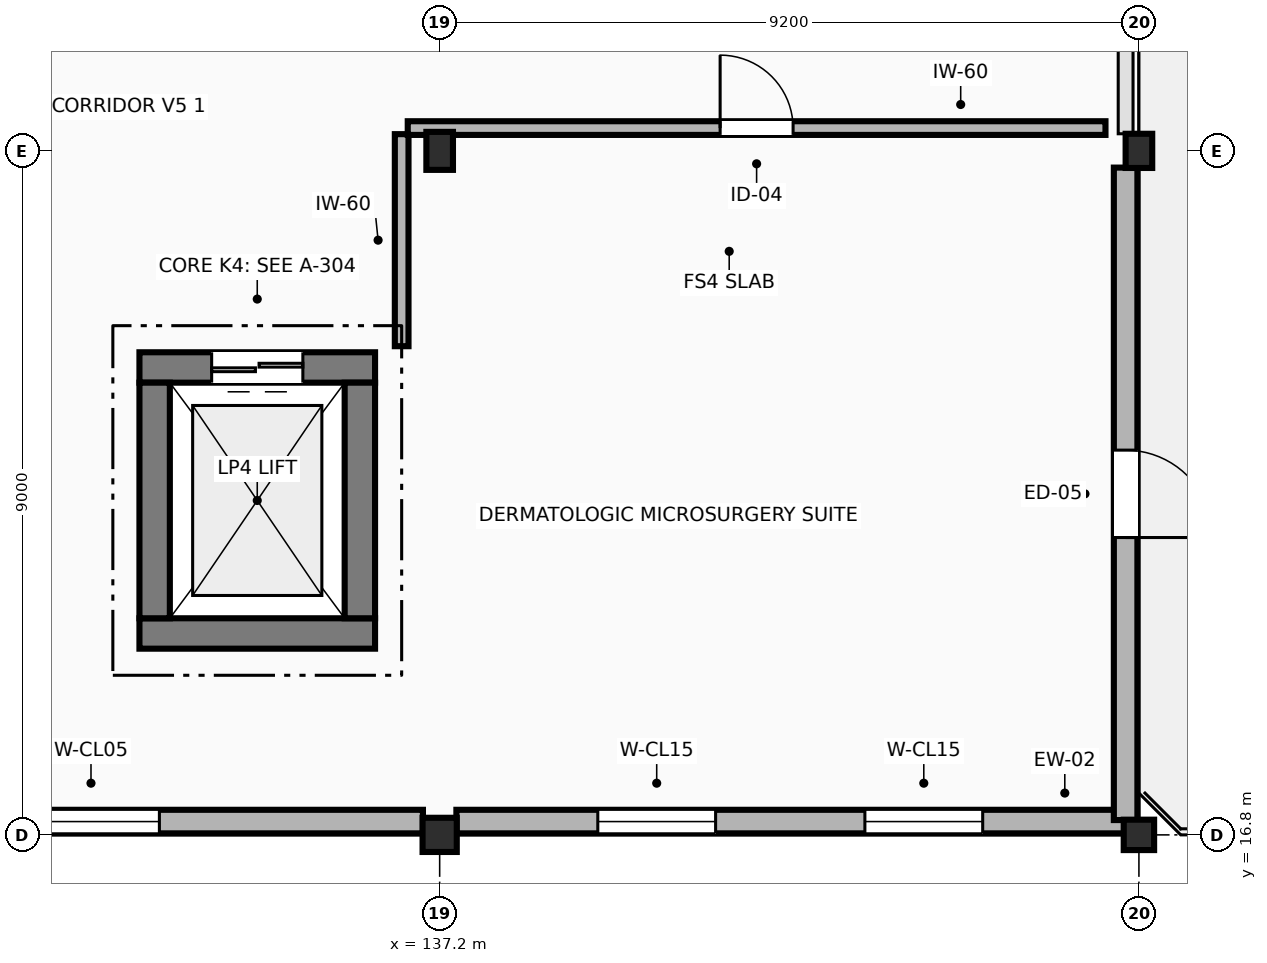
"""IFC4 building model, lengths in metres.
Left out: names, types, materials, properties, quantities, classifications, styles, units other than length and angle.
Written with IfcOpenShell. Run it as: python <this file> out.ifc"""

import sys

from ifc_helpers import new_model, si_unit, direction, frame, frame_2d, origin, origin_2d, place, context, subcontext, project, spatial, rectangle, extrude, element, fill, save


model = new_model("IFC4")
c1 = context("Model", 3, precision=1e-05, world=origin(), true_north=direction((0.0, 1.0)))
c2 = subcontext(c1, "Body", "Model", "MODEL_VIEW")
j1 = project(units=[si_unit("LENGTHUNIT", "METRE"), si_unit("PLANEANGLEUNIT", "RADIAN")], contexts=[c1])
p1 = place(None, origin())
s1 = spatial("IfcSite", under=j1, at=p1, CompositionType="ELEMENT")
p2 = place(p1, origin())
s2 = spatial("IfcBuilding", under=s1, at=p2, CompositionType="ELEMENT")
p3 = place(p2, frame((0.0, 0.0, 18.0)))
s3 = spatial("IfcBuildingStorey", under=s2, at=p3, CompositionType="ELEMENT", Elevation=18.0)
p4 = place(p3, frame((137.2, 16.8, 0.0), z_axis=(0.0, 0.0, 1.0), x_axis=(1.0, 0.0, 0.0)))
e1 = element("IfcColumn", 1, at=p4, inside=s3, PredefinedType="COLUMN", context=c2, shape_type="SweptSolid", body=[
    extrude(rectangle(XDim=0.45, YDim=0.45, at=origin_2d()), origin(), (0.0, 0.0, 1.0), 4.2),
])
p5 = place(p3, frame((137.2, 25.8, 0.0), z_axis=(0.0, 0.0, 1.0), x_axis=(1.0, 0.0, 0.0)))
e2 = element("IfcColumn", 2, at=p5, inside=s3, PredefinedType="COLUMN", context=c2, shape_type="SweptSolid", body=[
    extrude(rectangle(XDim=0.35, YDim=0.5, at=origin_2d()), origin(), (0.0, 0.0, 1.0), 4.2),
])
p6 = place(p3, frame((146.4, 16.8, 0.0), z_axis=(0.0, 0.0, 1.0), x_axis=(1.0, 0.0, 0.0)))
e3 = element("IfcColumn", 3, at=p6, inside=s3, PredefinedType="COLUMN", context=c2, shape_type="SweptSolid", body=[
    extrude(rectangle(XDim=0.4, YDim=0.4, at=origin_2d()), origin(), (0.0, 0.0, 1.0), 4.2),
])
p7 = place(p3, frame((146.4, 25.8, 0.0), z_axis=(0.0, 0.0, 1.0), x_axis=(1.0, 0.0, 0.0)))
e4 = element("IfcColumn", 4, at=p7, inside=s3, PredefinedType="COLUMN", context=c2, shape_type="SweptSolid", body=[
    extrude(rectangle(XDim=0.35, YDim=0.45, at=origin_2d()), origin(), (0.0, 0.0, 1.0), 4.2),
])
p8 = place(p3, frame((128.245, 16.975, 0.0), z_axis=(0.0, 0.0, 1.0), x_axis=(1.0, 0.0, 0.0)))
e5 = element("IfcWall", 5, at=p8, inside=s3, PredefinedType="STANDARD", context=c2, shape_type="SweptSolid", body=[
    extrude(rectangle(XDim=8.735, YDim=0.31, at=frame_2d((4.367, 0.0))), origin(), (0.0, 0.0, 1.0), 3.26),
])
p9 = place(p8, frame((3.468, 0.0, 0.95)))
e6 = element("IfcOpeningElement", 6, at=p9, cuts=e5, PredefinedType="OPENING", context=c2, shape_type="SweptSolid", body=[
    extrude(rectangle(XDim=1.8, YDim=1.5, at=frame_2d((0.9, 0.75))), frame((0.0, 0.165, 0.0), z_axis=(0.0, -1.0, 0.0), x_axis=(1.0, 0.0, 0.0)), (0.0, 0.0, 1.0), 0.33),
])
p10 = place(p3, frame((137.42, 16.975, 0.0), z_axis=(0.0, 0.0, 1.0), x_axis=(1.0, 0.0, 0.0)))
e7 = element("IfcWall", 7, at=p10, inside=s3, PredefinedType="STANDARD", context=c2, shape_type="SweptSolid", body=[
    extrude(rectangle(XDim=8.785, YDim=0.31, at=frame_2d((4.393, 0.0))), origin(), (0.0, 0.0, 1.0), 3.92),
])
p11 = place(p10, frame((1.861, 0.0, 0.95)))
e8 = element("IfcOpeningElement", 8, at=p11, cuts=e7, PredefinedType="OPENING", context=c2, shape_type="SweptSolid", body=[
    extrude(rectangle(XDim=1.55, YDim=1.45, at=frame_2d((0.775, 0.725))), frame((0.0, 0.165, 0.0), z_axis=(0.0, -1.0, 0.0), x_axis=(1.0, 0.0, 0.0)), (0.0, 0.0, 1.0), 0.33),
])
p12 = place(p10, frame((5.375, 0.0, 0.95)))
e9 = element("IfcOpeningElement", 9, at=p12, cuts=e7, PredefinedType="OPENING", context=c2, shape_type="SweptSolid", body=[
    extrude(rectangle(XDim=1.55, YDim=1.45, at=frame_2d((0.775, 0.725))), frame((0.0, 0.165, 0.0), z_axis=(0.0, -1.0, 0.0), x_axis=(1.0, 0.0, 0.0)), (0.0, 0.0, 1.0), 0.33),
])
p13 = place(p3, frame((146.225, 16.995, 0.0), z_axis=(0.0, 0.0, 1.0), x_axis=(0.0, 1.0, 0.0)))
e10 = element("IfcWall", 10, at=p13, inside=s3, PredefinedType="STANDARD", context=c2, shape_type="SweptSolid", body=[
    extrude(rectangle(XDim=8.585, YDim=0.31, at=frame_2d((4.292, 0.0))), origin(), (0.0, 0.0, 1.0), 3.92),
])
p14 = place(p13, frame((3.718, 0.0, 0.0)))
e11 = element("IfcOpeningElement", 11, at=p14, cuts=e10, PredefinedType="OPENING", context=c2, shape_type="SweptSolid", body=[
    extrude(rectangle(XDim=1.15, YDim=2.2, at=frame_2d((0.575, 1.1))), frame((0.0, 0.165, 0.0), z_axis=(0.0, -1.0, 0.0), x_axis=(1.0, 0.0, 0.0)), (0.0, 0.0, 1.0), 0.33),
])
p15 = place(p3, frame((133.25, 19.45, 0.0), z_axis=(0.0, 0.0, 1.0), x_axis=(1.0, 0.0, 0.0)))
e12 = element("IfcWall", 12, at=p15, inside=s3, PredefinedType="SHEAR", context=c2, shape_type="SweptSolid", body=[
    extrude(rectangle(XDim=3.1, YDim=0.4, at=frame_2d((1.55, 0.0))), origin(), (0.0, 0.0, 1.0), 4.2),
])
p16 = place(p3, frame((136.35, 22.95, 0.0), z_axis=(0.0, 0.0, 1.0), x_axis=(-1.0, 0.0, 0.0)))
e13 = element("IfcWall", 13, at=p16, inside=s3, PredefinedType="SHEAR", context=c2, shape_type="SweptSolid", body=[
    extrude(rectangle(XDim=3.1, YDim=0.4, at=frame_2d((1.55, 0.0))), origin(), (0.0, 0.0, 1.0), 4.2),
])
p17 = place(p16, frame((0.95, 0.0, 0.0)))
e14 = element("IfcOpeningElement", 14, at=p17, cuts=e13, PredefinedType="OPENING", context=c2, shape_type="SweptSolid", body=[
    extrude(rectangle(XDim=1.2, YDim=2.2, at=frame_2d((0.6, 1.1))), frame((0.0, 0.21, 0.0), z_axis=(0.0, -1.0, 0.0), x_axis=(1.0, 0.0, 0.0)), (0.0, 0.0, 1.0), 0.42),
])
for number, where, z_axis, x_axis in (
    (15, (133.45, 19.65, 0.0), (0.0, 0.0, 1.0), (0.0, 1.0, 0.0)),
    (16, (136.15, 22.75, 0.0), (0.0, 0.0, 1.0), (0.0, -1.0, 0.0)),
):
    element("IfcWall", number, at=place(p3, frame(where, z_axis=z_axis, x_axis=x_axis)), inside=s3, PredefinedType="SHEAR", context=c2, shape_type="SweptSolid", body=[
        extrude(rectangle(XDim=3.1, YDim=0.4, at=frame_2d((1.55, 0.0))), origin(), (0.0, 0.0, 1.0), 4.2),
    ])
p18 = place(p3, frame((136.7, 23.23, 0.0), z_axis=(0.0, 0.0, 1.0), x_axis=(0.0, 1.0, 0.0)))
e17 = element("IfcWall", 17, at=p18, inside=s3, PredefinedType="PARTITIONING", context=c2, shape_type="SweptSolid", body=[
    extrude(rectangle(XDim=2.79, YDim=0.18, at=frame_2d((1.395, 0.0))), origin(), (0.0, 0.0, 1.0), 3.27),
])
p19 = place(p3, frame((136.78, 26.1, 0.0), z_axis=(0.0, 0.0, 1.0), x_axis=(1.0, 0.0, 0.0)))
e18 = element("IfcWall", 18, at=p19, inside=s3, PredefinedType="PARTITIONING", context=c2, shape_type="SweptSolid", body=[
    extrude(rectangle(XDim=9.18, YDim=0.18, at=frame_2d((4.59, 0.0))), origin(), (0.0, 0.0, 1.0), 3.92),
])
p20 = place(p19, frame((4.11, 0.0, 0.0)))
e19 = element("IfcOpeningElement", 19, at=p20, cuts=e18, PredefinedType="OPENING", context=c2, shape_type="SweptSolid", body=[
    extrude(rectangle(XDim=0.96, YDim=2.1, at=frame_2d((0.48, 1.05))), frame((0.0, 0.1, 0.0), z_axis=(0.0, -1.0, 0.0), x_axis=(1.0, 0.0, 0.0)), (0.0, 0.0, 1.0), 0.2),
])
p21 = place(p9, origin())
e20 = element("IfcWindow", 20, at=p21, inside=s3, PartitioningType="SINGLE_PANEL", PredefinedType="WINDOW", context=c2, shape_type="SweptSolid", body=[
    extrude(rectangle(XDim=1.8, YDim=1.5, at=frame_2d((0.9, 0.75))), frame((0.0, 0.03, 0.0), z_axis=(0.0, -1.0, 0.0), x_axis=(1.0, 0.0, 0.0)), (0.0, 0.0, 1.0), 0.06),
])
fill(e6, e20)
p22 = place(p11, origin())
e21 = element("IfcWindow", 21, at=p22, inside=s3, PartitioningType="SINGLE_PANEL", PredefinedType="WINDOW", context=c2, shape_type="SweptSolid", body=[
    extrude(rectangle(XDim=1.55, YDim=1.45, at=frame_2d((0.775, 0.725))), frame((0.0, 0.03, 0.0), z_axis=(0.0, -1.0, 0.0), x_axis=(1.0, 0.0, 0.0)), (0.0, 0.0, 1.0), 0.06),
])
fill(e8, e21)
p23 = place(p12, origin())
e22 = element("IfcWindow", 22, at=p23, inside=s3, PartitioningType="SINGLE_PANEL", PredefinedType="WINDOW", context=c2, shape_type="SweptSolid", body=[
    extrude(rectangle(XDim=1.55, YDim=1.45, at=frame_2d((0.775, 0.725))), frame((0.0, 0.03, 0.0), z_axis=(0.0, -1.0, 0.0), x_axis=(1.0, 0.0, 0.0)), (0.0, 0.0, 1.0), 0.06),
])
fill(e9, e22)
p24 = place(p14, frame((1.15, 0.0, 0.0), z_axis=(0.0, 0.0, 1.0), x_axis=(-1.0, 0.0, 0.0)))
e23 = element("IfcDoor", 23, at=p24, inside=s3, OperationType="SINGLE_SWING_RIGHT", PredefinedType="DOOR", context=c2, shape_type="SweptSolid", body=[
    extrude(rectangle(XDim=1.15, YDim=2.2, at=frame_2d((0.575, 1.1))), frame((0.0, 0.025, 0.0), z_axis=(0.0, -1.0, 0.0), x_axis=(1.0, 0.0, 0.0)), (0.0, 0.0, 1.0), 0.05),
])
fill(e11, e23)
p25 = place(p17, origin())
e24 = element("IfcDoor", 24, at=p25, inside=s3, OperationType="DOUBLE_DOOR_SLIDING", PredefinedType="DOOR", context=c2, shape_type="SweptSolid", body=[
    extrude(rectangle(XDim=1.2, YDim=2.2, at=frame_2d((0.6, 1.1))), frame((0.0, 0.025, 0.0), z_axis=(0.0, -1.0, 0.0), x_axis=(1.0, 0.0, 0.0)), (0.0, 0.0, 1.0), 0.05),
])
fill(e14, e24)
p26 = place(p20, origin())
e25 = element("IfcDoor", 25, at=p26, inside=s3, OperationType="SINGLE_SWING_LEFT", PredefinedType="DOOR", context=c2, shape_type="SweptSolid", body=[
    extrude(rectangle(XDim=0.96, YDim=2.1, at=frame_2d((0.48, 1.05))), frame((0.0, 0.025, 0.0), z_axis=(0.0, -1.0, 0.0), x_axis=(1.0, 0.0, 0.0)), (0.0, 0.0, 1.0), 0.05),
])
fill(e19, e25)
save(model, sys.argv[1])
